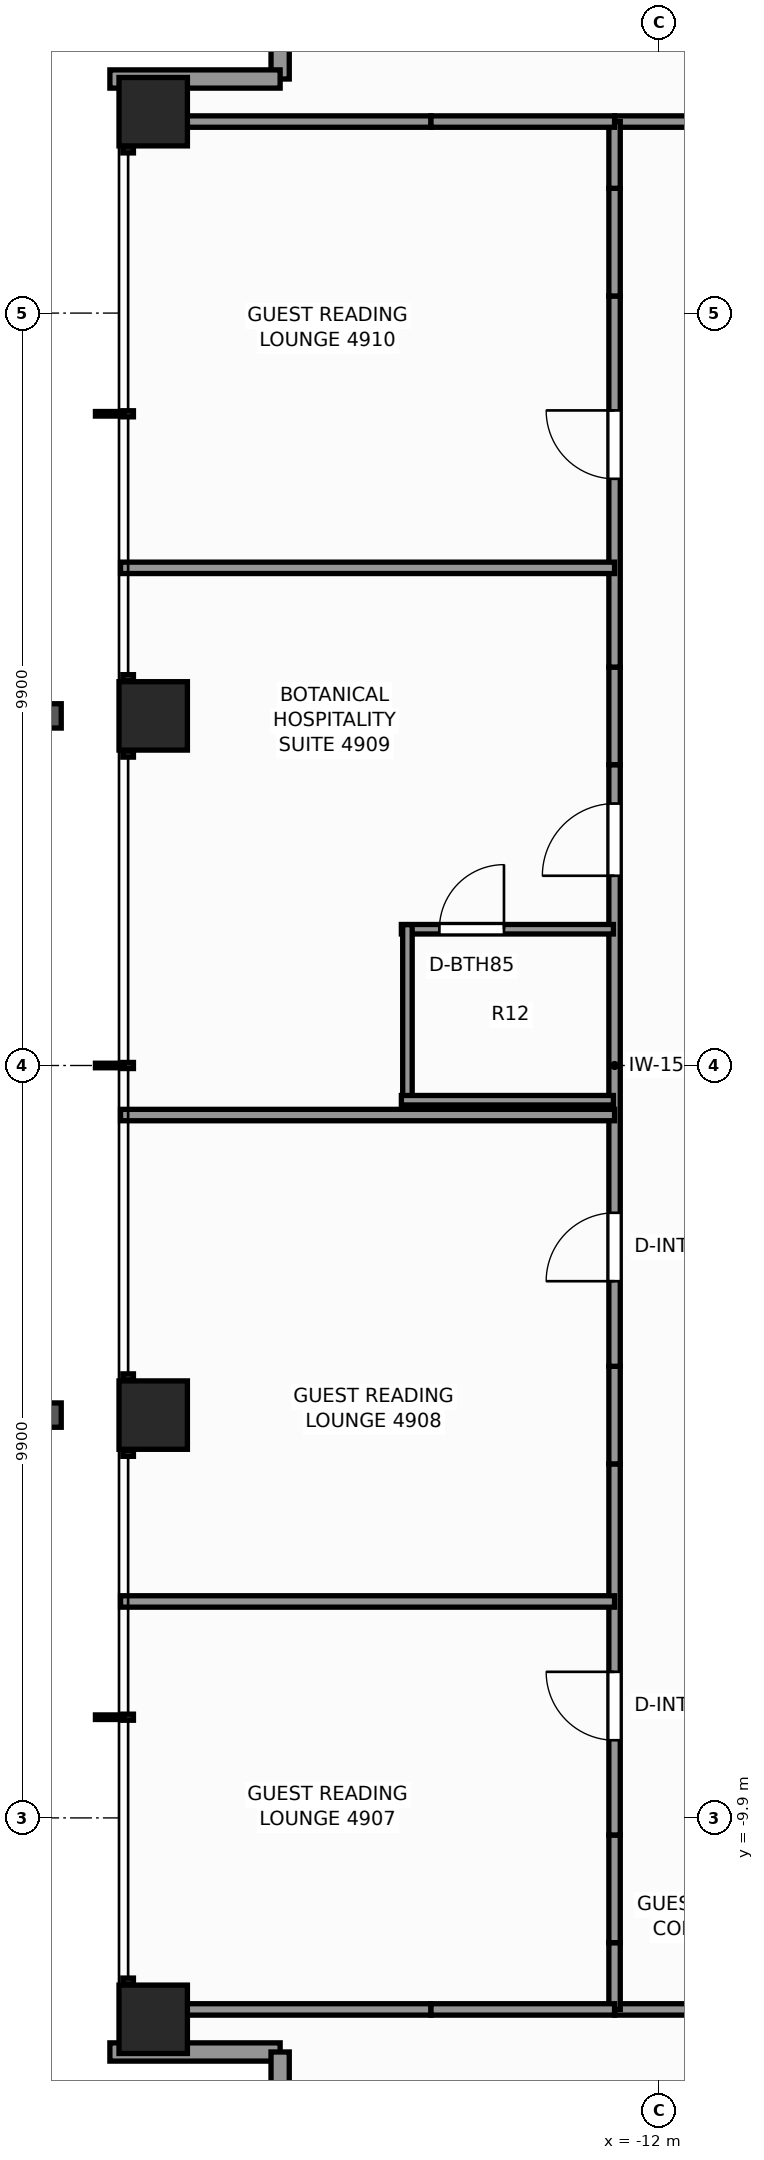
"""IFC4 building model, lengths in metres.
Left out: names, types, materials, properties, quantities, classifications, styles, units other than length and angle.
Written with IfcOpenShell. Run it as: python <this file> out.ifc"""

import sys

from ifc_helpers import new_model, si_unit, direction, frame, frame_2d, origin, origin_2d, place, context, subcontext, project, spatial, rectangle, extrude, element, fill, save


model = new_model("IFC4")
c1 = context("Model", 3, precision=1e-05, world=origin(), true_north=direction((0.0, 1.0)))
c2 = subcontext(c1, "Body", "Model", "MODEL_VIEW")
j1 = project(units=[si_unit("LENGTHUNIT", "METRE"), si_unit("PLANEANGLEUNIT", "RADIAN")], contexts=[c1])
p1 = place(None, origin())
s1 = spatial("IfcSite", under=j1, at=p1, CompositionType="ELEMENT")
p2 = place(p1, origin())
s2 = spatial("IfcBuilding", under=s1, at=p2, CompositionType="ELEMENT")
p3 = place(p2, frame((0.0, 0.0, 170.1)))
s3 = spatial("IfcBuildingStorey", under=s2, at=p3, CompositionType="ELEMENT", Elevation=170.1)
for number, where, z_axis, x_axis in (
    (1, (-18.65, -12.55, 0.0), (0.0, 0.0, 1.0), (1.0, 0.0, 0.0)),
    (2, (-18.65, -4.6, 0.0), (0.0, 0.0, 1.0), (1.0, 0.0, 0.0)),
    (3, (-18.65, 4.6, 0.0), (0.0, 0.0, 1.0), (1.0, 0.0, 0.0)),
    (4, (-18.65, 12.55, 0.0), (0.0, 0.0, 1.0), (1.0, 0.0, 0.0)),
):
    element("IfcColumn", number, at=place(p3, frame(where, z_axis=z_axis, x_axis=x_axis)), inside=s3, PredefinedType="COLUMN", context=c2, shape_type="SweptSolid", body=[
        extrude(rectangle(XDim=0.9, YDim=0.9, at=origin_2d()), origin(), (0.0, 0.0, 1.0), 3.3),
    ])
for number, where, z_axis, x_axis in (
    (5, (-16.98, 12.98, 0.0), (0.0, 0.0, 1.0), (0.0, 1.0, 0.0)),
    (6, (-19.22, 12.98, 0.0), (0.0, 0.0, 1.0), (1.0, 0.0, 0.0)),
    (7, (-16.98, -12.98, 0.0), (0.0, 0.0, 1.0), (-1.0, 0.0, 0.0)),
    (8, (-16.98, -15.22, 0.0), (0.0, 0.0, 1.0), (0.0, 1.0, 0.0)),
):
    element("IfcWall", number, at=place(p3, frame(where, z_axis=z_axis, x_axis=x_axis)), inside=s3, PredefinedType="STANDARD", context=c2, shape_type="SweptSolid", body=[
        extrude(rectangle(XDim=2.24, YDim=0.24, at=frame_2d((1.12, 0.0))), origin(), (0.0, 0.0, 1.0), 1.275),
    ])
for number, where, z_axis, x_axis in (
    (9, (-12.58, -12.42, 0.0), (0.0, 0.0, 1.0), (1.0, 0.0, 0.0)),
    (10, (-12.58, 12.42, 0.0), (0.0, 0.0, 1.0), (1.0, 0.0, 0.0)),
):
    element("IfcWall", number, at=place(p3, frame(where, z_axis=z_axis, x_axis=x_axis)), inside=s3, PredefinedType="PARTITIONING", context=c2, shape_type="SweptSolid", body=[
        extrude(rectangle(XDim=1.094, YDim=0.15, at=frame_2d((0.547, 0.0))), origin(), (0.0, 0.0, 1.0), 3.08),
    ])
p4 = place(p3, frame((-12.58, -12.42, 0.0), z_axis=(0.0, 0.0, 1.0), x_axis=(0.0, 1.0, 0.0)))
e11 = element("IfcWall", 11, at=p4, inside=s3, PredefinedType="PARTITIONING", context=c2, shape_type="SweptSolid", body=[
    extrude(rectangle(XDim=0.878, YDim=0.15, at=frame_2d((0.439, 0.0))), origin(), (0.0, 0.0, 1.0), 3.08),
])
p5 = place(p3, frame((-12.58, -11.542, 0.0), z_axis=(0.0, 0.0, 1.0), x_axis=(0.0, 1.0, 0.0)))
e12 = element("IfcWall", 12, at=p5, inside=s3, PredefinedType="PARTITIONING", context=c2, shape_type="SweptSolid", body=[
    extrude(rectangle(XDim=1.417, YDim=0.15, at=frame_2d((0.708, 0.0))), origin(), (0.0, 0.0, 1.0), 1.265),
])
p6 = place(p3, frame((-12.58, -10.125, 0.0), z_axis=(0.0, 0.0, 1.0), x_axis=(0.0, 1.0, 0.0)))
e13 = element("IfcWall", 13, at=p6, inside=s3, PredefinedType="PARTITIONING", context=c2, shape_type="SweptSolid", body=[
    extrude(rectangle(XDim=4.883, YDim=0.15, at=frame_2d((2.441, 0.0))), origin(), (0.0, 0.0, 1.0), 3.08),
])
p7 = place(p6, frame((1.247, 0.0, 0.0)))
e14 = element("IfcOpeningElement", 14, at=p7, cuts=e13, PredefinedType="OPENING", context=c2, shape_type="SweptSolid", body=[
    extrude(rectangle(XDim=0.9, YDim=2.06, at=frame_2d((0.45, 1.03))), frame((0.0, 0.085, 0.0), z_axis=(0.0, -1.0, 0.0), x_axis=(1.0, 0.0, 0.0)), (0.0, 0.0, 1.0), 0.17),
])
p8 = place(p3, frame((-12.58, -5.242, 0.0), z_axis=(0.0, 0.0, 1.0), x_axis=(0.0, 1.0, 0.0)))
e15 = element("IfcWall", 15, at=p8, inside=s3, PredefinedType="PARTITIONING", context=c2, shape_type="SweptSolid", body=[
    extrude(rectangle(XDim=1.284, YDim=0.15, at=frame_2d((0.642, 0.0))), origin(), (0.0, 0.0, 1.0), 1.265),
])
p9 = place(p3, frame((-12.58, -3.958, 0.0), z_axis=(0.0, 0.0, 1.0), x_axis=(0.0, 1.0, 0.0)))
e16 = element("IfcWall", 16, at=p9, inside=s3, PredefinedType="PARTITIONING", context=c2, shape_type="SweptSolid", body=[
    extrude(rectangle(XDim=7.916, YDim=0.15, at=frame_2d((3.958, 0.0))), origin(), (0.0, 0.0, 1.0), 2.605),
])
p10 = place(p9, frame((1.12, 0.0, 0.0)))
e17 = element("IfcOpeningElement", 17, at=p10, cuts=e16, PredefinedType="OPENING", context=c2, shape_type="SweptSolid", body=[
    extrude(rectangle(XDim=0.9, YDim=2.06, at=frame_2d((0.45, 1.03))), frame((0.0, 0.085, 0.0), z_axis=(0.0, -1.0, 0.0), x_axis=(1.0, 0.0, 0.0)), (0.0, 0.0, 1.0), 0.17),
])
p11 = place(p9, frame((6.455, 0.0, 0.0)))
e18 = element("IfcOpeningElement", 18, at=p11, cuts=e16, PredefinedType="OPENING", context=c2, shape_type="SweptSolid", body=[
    extrude(rectangle(XDim=0.95, YDim=2.06, at=frame_2d((0.475, 1.03))), frame((0.0, 0.085, 0.0), z_axis=(0.0, -1.0, 0.0), x_axis=(1.0, 0.0, 0.0)), (0.0, 0.0, 1.0), 0.17),
])
p12 = place(p3, frame((-12.58, 3.958, 0.0), z_axis=(0.0, 0.0, 1.0), x_axis=(0.0, 1.0, 0.0)))
e19 = element("IfcWall", 19, at=p12, inside=s3, PredefinedType="PARTITIONING", context=c2, shape_type="SweptSolid", body=[
    extrude(rectangle(XDim=1.284, YDim=0.15, at=frame_2d((0.642, 0.0))), origin(), (0.0, 0.0, 1.0), 1.265),
])
p13 = place(p3, frame((-12.58, 5.242, 0.0), z_axis=(0.0, 0.0, 1.0), x_axis=(0.0, 1.0, 0.0)))
e20 = element("IfcWall", 20, at=p13, inside=s3, PredefinedType="PARTITIONING", context=c2, shape_type="SweptSolid", body=[
    extrude(rectangle(XDim=4.883, YDim=0.15, at=frame_2d((2.441, 0.0))), origin(), (0.0, 0.0, 1.0), 3.08),
])
p14 = place(p13, frame((2.477, 0.0, 0.0)))
e21 = element("IfcOpeningElement", 21, at=p14, cuts=e20, PredefinedType="OPENING", context=c2, shape_type="SweptSolid", body=[
    extrude(rectangle(XDim=0.9, YDim=2.06, at=frame_2d((0.45, 1.03))), frame((0.0, 0.085, 0.0), z_axis=(0.0, -1.0, 0.0), x_axis=(1.0, 0.0, 0.0)), (0.0, 0.0, 1.0), 0.17),
])
p15 = place(p3, frame((-12.58, 10.125, 0.0), z_axis=(0.0, 0.0, 1.0), x_axis=(0.0, 1.0, 0.0)))
e22 = element("IfcWall", 22, at=p15, inside=s3, PredefinedType="PARTITIONING", context=c2, shape_type="SweptSolid", body=[
    extrude(rectangle(XDim=1.417, YDim=0.15, at=frame_2d((0.708, 0.0))), origin(), (0.0, 0.0, 1.0), 1.265),
])
p16 = place(p3, frame((-12.58, 11.542, 0.0), z_axis=(0.0, 0.0, 1.0), x_axis=(0.0, 1.0, 0.0)))
e23 = element("IfcWall", 23, at=p16, inside=s3, PredefinedType="PARTITIONING", context=c2, shape_type="SweptSolid", body=[
    extrude(rectangle(XDim=0.878, YDim=0.15, at=frame_2d((0.439, 0.0))), origin(), (0.0, 0.0, 1.0), 3.08),
])
p17 = place(p3, frame((-19.08, -12.42, 0.0), z_axis=(0.0, 0.0, 1.0), x_axis=(1.0, 0.0, 0.0)))
e24 = element("IfcWall", 24, at=p17, inside=s3, PredefinedType="PARTITIONING", context=c2, shape_type="SweptSolid", body=[
    extrude(rectangle(XDim=4.085, YDim=0.15, at=frame_2d((2.042, 0.0))), origin(), (0.0, 0.0, 1.0), 1.265),
])
p18 = place(p3, frame((-14.995, -12.42, 0.0), z_axis=(0.0, 0.0, 1.0), x_axis=(1.0, 0.0, 0.0)))
e25 = element("IfcWall", 25, at=p18, inside=s3, PredefinedType="PARTITIONING", context=c2, shape_type="SweptSolid", body=[
    extrude(rectangle(XDim=2.415, YDim=0.15, at=frame_2d((1.208, 0.0))), origin(), (0.0, 0.0, 1.0), 3.08),
])
p19 = place(p3, frame((-19.08, 12.42, 0.0), z_axis=(0.0, 0.0, 1.0), x_axis=(1.0, 0.0, 0.0)))
e26 = element("IfcWall", 26, at=p19, inside=s3, PredefinedType="PARTITIONING", context=c2, shape_type="SweptSolid", body=[
    extrude(rectangle(XDim=4.085, YDim=0.15, at=frame_2d((2.042, 0.0))), origin(), (0.0, 0.0, 1.0), 1.265),
])
p20 = place(p3, frame((-14.995, 12.42, 0.0), z_axis=(0.0, 0.0, 1.0), x_axis=(1.0, 0.0, 0.0)))
e27 = element("IfcWall", 27, at=p20, inside=s3, PredefinedType="PARTITIONING", context=c2, shape_type="SweptSolid", body=[
    extrude(rectangle(XDim=2.415, YDim=0.15, at=frame_2d((1.208, 0.0))), origin(), (0.0, 0.0, 1.0), 3.08),
])
p21 = place(p3, frame((-19.08, -7.052, 0.0), z_axis=(0.0, 0.0, 1.0), x_axis=(1.0, 0.0, 0.0)))
e28 = element("IfcWall", 28, at=p21, inside=s3, PredefinedType="PARTITIONING", context=c2, shape_type="SweptSolid", body=[
    extrude(rectangle(XDim=6.5, YDim=0.15, at=frame_2d((3.25, 0.0))), origin(), (0.0, 0.0, 1.0), 2.453),
])
p22 = place(p3, frame((-19.08, -0.652, 0.0), z_axis=(0.0, 0.0, 1.0), x_axis=(1.0, 0.0, 0.0)))
e29 = element("IfcWall", 29, at=p22, inside=s3, PredefinedType="PARTITIONING", context=c2, shape_type="SweptSolid", body=[
    extrude(rectangle(XDim=6.5, YDim=0.15, at=frame_2d((3.25, 0.0))), origin(), (0.0, 0.0, 1.0), 3.08),
])
p23 = place(p3, frame((-19.08, 6.548, 0.0), z_axis=(0.0, 0.0, 1.0), x_axis=(1.0, 0.0, 0.0)))
e30 = element("IfcWall", 30, at=p23, inside=s3, PredefinedType="PARTITIONING", context=c2, shape_type="SweptSolid", body=[
    extrude(rectangle(XDim=6.5, YDim=0.15, at=frame_2d((3.25, 0.0))), origin(), (0.0, 0.0, 1.0), 2.453),
])
p24 = place(p3, frame((-15.385, 1.793, 0.0), z_axis=(0.0, 0.0, 1.0), x_axis=(1.0, 0.0, 0.0)))
e31 = element("IfcWall", 31, at=p24, inside=s3, PredefinedType="PARTITIONING", context=c2, shape_type="SweptSolid", body=[
    extrude(rectangle(XDim=2.79, YDim=0.125, at=frame_2d((1.395, 0.0))), origin(), (0.0, 0.0, 1.0), 3.08),
])
p25 = place(p24, frame((0.5, 0.0, 0.0)))
e32 = element("IfcOpeningElement", 32, at=p25, cuts=e31, PredefinedType="OPENING", context=c2, shape_type="SweptSolid", body=[
    extrude(rectangle(XDim=0.85, YDim=2.03, at=frame_2d((0.425, 1.015))), frame((0.0, 0.073, 0.0), z_axis=(0.0, -1.0, 0.0), x_axis=(1.0, 0.0, 0.0)), (0.0, 0.0, 1.0), 0.145),
])
p26 = place(p3, frame((-15.305, -0.517, 0.0), z_axis=(0.0, 0.0, 1.0), x_axis=(0.0, 1.0, 0.0)))
e33 = element("IfcWall", 33, at=p26, inside=s3, PredefinedType="PARTITIONING", context=c2, shape_type="SweptSolid", body=[
    extrude(rectangle(XDim=2.37, YDim=0.125, at=frame_2d((1.185, 0.0))), origin(), (0.0, 0.0, 1.0), 2.605),
])
p27 = place(p3, frame((-15.385, -0.457, 0.0), z_axis=(0.0, 0.0, 1.0), x_axis=(1.0, 0.0, 0.0)))
e34 = element("IfcWall", 34, at=p27, inside=s3, PredefinedType="PARTITIONING", context=c2, shape_type="SweptSolid", body=[
    extrude(rectangle(XDim=2.79, YDim=0.125, at=frame_2d((1.395, 0.0))), origin(), (0.0, 0.0, 1.0), 3.08),
])
p28 = place(p7, origin())
e35 = element("IfcDoor", 35, at=p28, inside=s3, OperationType="SINGLE_SWING_RIGHT", PredefinedType="DOOR", context=c2, shape_type="SweptSolid", body=[
    extrude(rectangle(XDim=0.9, YDim=2.06, at=frame_2d((0.45, 1.03))), frame((0.0, 0.025, 0.0), z_axis=(0.0, -1.0, 0.0), x_axis=(1.0, 0.0, 0.0)), (0.0, 0.0, 1.0), 0.05),
])
fill(e14, e35)
p29 = place(p10, origin())
e36 = element("IfcDoor", 36, at=p29, inside=s3, OperationType="SINGLE_SWING_LEFT", PredefinedType="DOOR", context=c2, shape_type="SweptSolid", body=[
    extrude(rectangle(XDim=0.9, YDim=2.06, at=frame_2d((0.45, 1.03))), frame((0.0, 0.025, 0.0), z_axis=(0.0, -1.0, 0.0), x_axis=(1.0, 0.0, 0.0)), (0.0, 0.0, 1.0), 0.05),
])
fill(e17, e36)
p30 = place(p25, origin())
e37 = element("IfcDoor", 37, at=p30, inside=s3, OperationType="SINGLE_SWING_RIGHT", PredefinedType="DOOR", context=c2, shape_type="SweptSolid", body=[
    extrude(rectangle(XDim=0.85, YDim=2.03, at=frame_2d((0.425, 1.015))), frame((0.0, 0.025, 0.0), z_axis=(0.0, -1.0, 0.0), x_axis=(1.0, 0.0, 0.0)), (0.0, 0.0, 1.0), 0.05),
])
fill(e32, e37)
p31 = place(p11, origin())
e38 = element("IfcDoor", 38, at=p31, inside=s3, OperationType="SINGLE_SWING_LEFT", PredefinedType="DOOR", context=c2, shape_type="SweptSolid", body=[
    extrude(rectangle(XDim=0.95, YDim=2.06, at=frame_2d((0.475, 1.03))), frame((0.0, 0.025, 0.0), z_axis=(0.0, -1.0, 0.0), x_axis=(1.0, 0.0, 0.0)), (0.0, 0.0, 1.0), 0.05),
])
fill(e18, e38)
p32 = place(p14, origin())
e39 = element("IfcDoor", 39, at=p32, inside=s3, OperationType="SINGLE_SWING_RIGHT", PredefinedType="DOOR", context=c2, shape_type="SweptSolid", body=[
    extrude(rectangle(XDim=0.9, YDim=2.06, at=frame_2d((0.45, 1.03))), frame((0.0, 0.025, 0.0), z_axis=(0.0, -1.0, 0.0), x_axis=(1.0, 0.0, 0.0)), (0.0, 0.0, 1.0), 0.05),
])
fill(e21, e39)
save(model, sys.argv[1])
